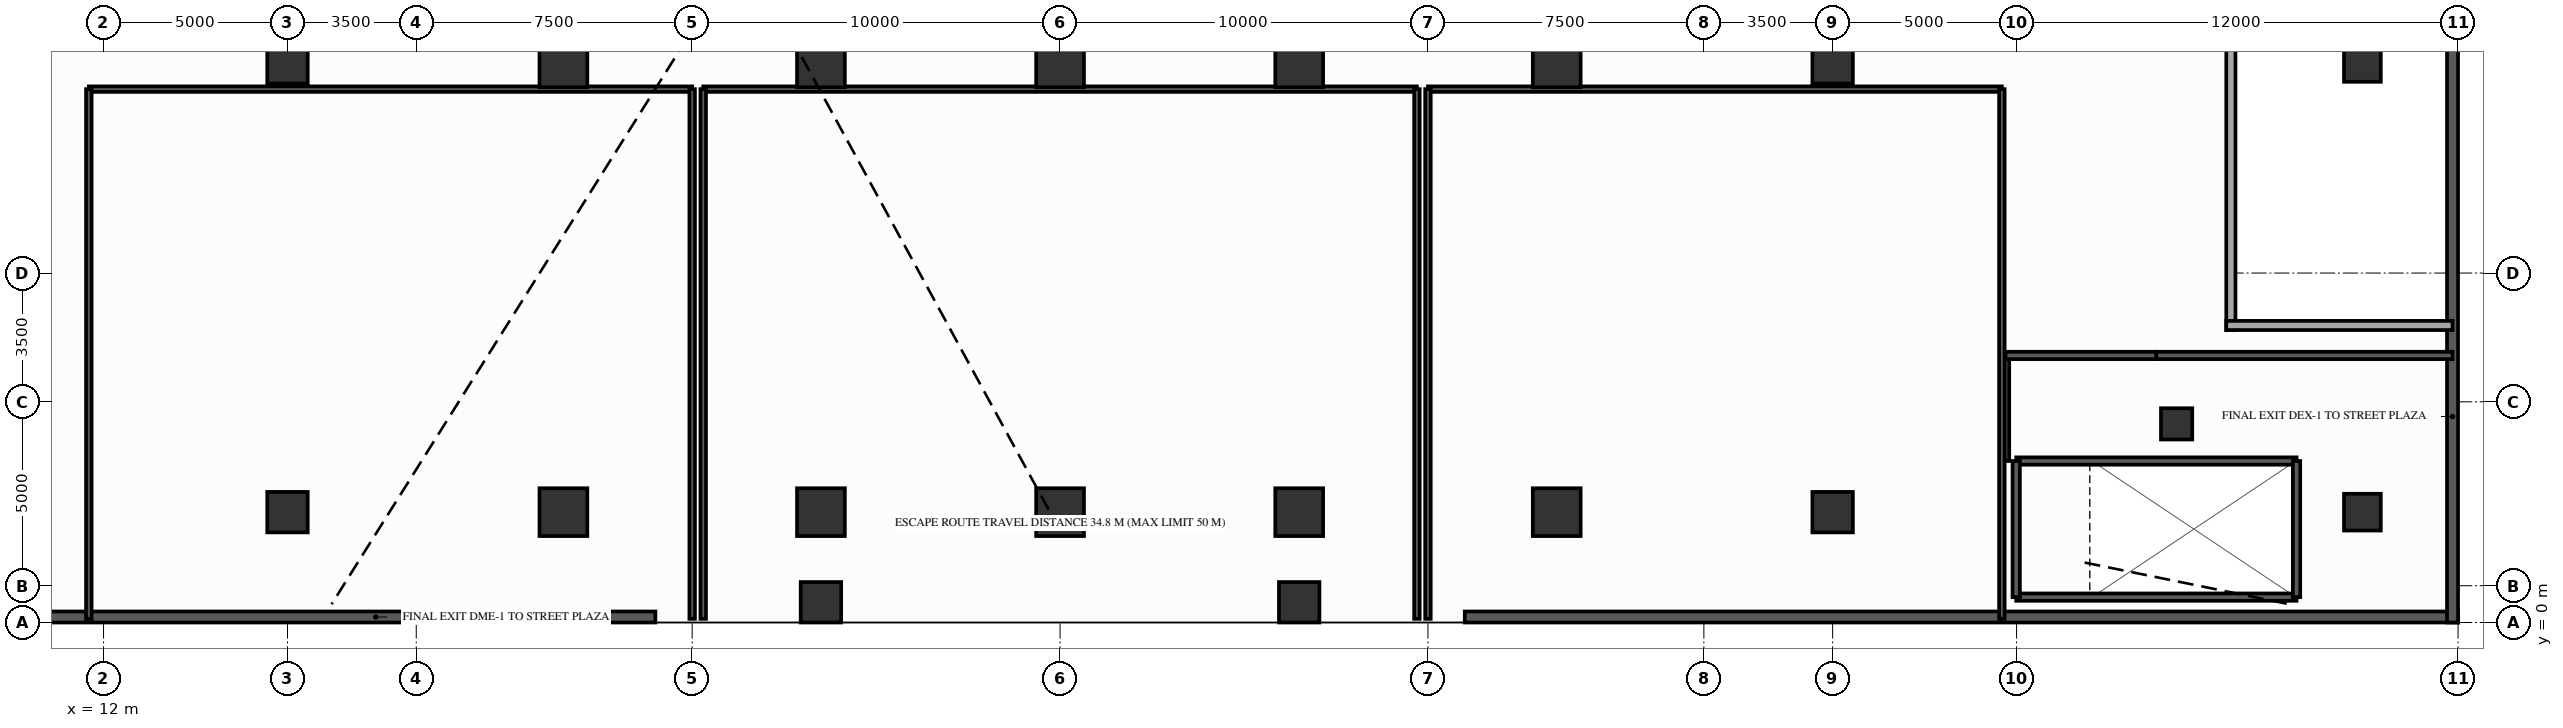
"""IFC4 building model, lengths in metres.
Left out: names, types, materials, properties, quantities, classifications, styles, units other than length and angle.
Written with IfcOpenShell. Run it as: python <this file> out.ifc"""

import sys

from ifc_helpers import new_model, si_unit, direction, frame, frame_2d, origin, origin_2d, place, context, subcontext, project, spatial, rectangle, circle, extrude, source, transform, mapped, element, fill, save


model = new_model("IFC4")
c1 = context("Model", 3, precision=1e-05, world=origin(), true_north=direction((0.0, 1.0)))
c2 = subcontext(c1, "Body", "Model", "MODEL_VIEW")
j1 = project(units=[si_unit("LENGTHUNIT", "METRE"), si_unit("PLANEANGLEUNIT", "RADIAN")], contexts=[c1])
p1 = place(None, origin())
s1 = spatial("IfcSite", under=j1, at=p1, CompositionType="ELEMENT")
p2 = place(p1, origin())
s2 = spatial("IfcBuilding", under=s1, at=p2, CompositionType="ELEMENT")
p3 = place(p2, origin())
s3 = spatial("IfcBuildingStorey", under=s2, at=p3, CompositionType="ELEMENT", Elevation=0.0)
m1 = source(origin(), c2, "Body", "SweptSolid", [
    extrude(circle(Radius=0.5, at=origin_2d()), origin(), (0.0, 0.0, 1.0), 4.2),
])
for number, where, z_axis, x_axis in (
    (1, (73.4, 3.0, 0.0), (0.0, 0.0, 1.0), (1.0, 0.0, 0.0)),
    (2, (73.4, 15.2, 0.0), (0.0, 0.0, 1.0), (1.0, 0.0, 0.0)),
):
    element("IfcColumn", number, at=place(p3, frame(where, z_axis=z_axis, x_axis=x_axis)), inside=s3, PredefinedType="COLUMN", context=c2, shape_type="MappedRepresentation", body=[
        mapped(m1, transform((0.0, 0.0, 0.0), scale=1.0)),
    ])
m2 = source(origin(), c2, "Body", "SweptSolid", [
    extrude(circle(Radius=0.425, at=origin_2d()), origin(), (0.0, 0.0, 1.0), 4.2),
])
p4 = place(p3, frame((68.35, 5.4, 0.0), z_axis=(0.0, 0.0, 1.0), x_axis=(1.0, 0.0, 0.0)))
e3 = element("IfcColumn", 3, at=p4, inside=s3, PredefinedType="COLUMN", context=c2, shape_type="MappedRepresentation", body=[
    mapped(m2, transform((0.0, 0.0, 0.0), scale=1.0)),
])
m3 = source(origin(), c2, "Body", "SweptSolid", [
    extrude(rectangle(XDim=1.1, YDim=1.1, at=origin_2d()), origin(), (0.0, 0.0, 1.0), 4.2),
])
for number, where, z_axis, x_axis in (
    (4, (17.0, 3.0, 0.0), (0.0, 0.0, 1.0), (1.0, 0.0, 0.0)),
    (5, (59.0, 3.0, 0.0), (0.0, 0.0, 1.0), (1.0, 0.0, 0.0)),
    (6, (17.0, 15.2, 0.0), (0.0, 0.0, 1.0), (1.0, 0.0, 0.0)),
    (7, (59.0, 15.2, 0.0), (0.0, 0.0, 1.0), (1.0, 0.0, 0.0)),
):
    element("IfcColumn", number, at=place(p3, frame(where, z_axis=z_axis, x_axis=x_axis)), inside=s3, PredefinedType="COLUMN", context=c2, shape_type="MappedRepresentation", body=[
        mapped(m3, transform((0.0, 0.0, 0.0), scale=1.0)),
    ])
m4 = source(origin(), c2, "Body", "SweptSolid", [
    extrude(rectangle(XDim=1.3, YDim=1.3, at=origin_2d()), origin(), (0.0, 0.0, 1.0), 4.2),
])
for number, where, z_axis, x_axis in (
    (8, (24.5, 3.0, 0.0), (0.0, 0.0, 1.0), (1.0, 0.0, 0.0)),
    (9, (24.5, 15.2, 0.0), (0.0, 0.0, 1.0), (1.0, 0.0, 0.0)),
):
    element("IfcColumn", number, at=place(p3, frame(where, z_axis=z_axis, x_axis=x_axis)), inside=s3, PredefinedType="COLUMN", context=c2, shape_type="MappedRepresentation", body=[
        mapped(m4, transform((0.0, 0.0, 0.0), scale=1.0)),
    ])
p5 = place(p3, frame((31.5, 0.55, 0.0), z_axis=(0.0, 0.0, 1.0), x_axis=(1.0, 0.0, 0.0)))
e10 = element("IfcColumn", 10, at=p5, inside=s3, PredefinedType="COLUMN", context=c2, shape_type="MappedRepresentation", body=[
    mapped(m3, transform((0.0, 0.0, 0.0), scale=1.0)),
])
for number, where, z_axis, x_axis in (
    (11, (31.5, 3.0, 0.0), (0.0, 0.0, 1.0), (1.0, 0.0, 0.0)),
    (12, (31.5, 15.2, 0.0), (0.0, 0.0, 1.0), (1.0, 0.0, 0.0)),
    (13, (38.0, 3.0, 0.0), (0.0, 0.0, 1.0), (1.0, 0.0, 0.0)),
    (14, (38.0, 15.2, 0.0), (0.0, 0.0, 1.0), (1.0, 0.0, 0.0)),
):
    element("IfcColumn", number, at=place(p3, frame(where, z_axis=z_axis, x_axis=x_axis)), inside=s3, PredefinedType="COLUMN", context=c2, shape_type="MappedRepresentation", body=[
        mapped(m4, transform((0.0, 0.0, 0.0), scale=1.0)),
    ])
p6 = place(p3, frame((44.5, 0.55, 0.0), z_axis=(0.0, 0.0, 1.0), x_axis=(1.0, 0.0, 0.0)))
e15 = element("IfcColumn", 15, at=p6, inside=s3, PredefinedType="COLUMN", context=c2, shape_type="MappedRepresentation", body=[
    mapped(m3, transform((0.0, 0.0, 0.0), scale=1.0)),
])
for number, where, z_axis, x_axis in (
    (16, (44.5, 3.0, 0.0), (0.0, 0.0, 1.0), (1.0, 0.0, 0.0)),
    (17, (44.5, 15.2, 0.0), (0.0, 0.0, 1.0), (1.0, 0.0, 0.0)),
    (18, (51.5, 3.0, 0.0), (0.0, 0.0, 1.0), (1.0, 0.0, 0.0)),
    (19, (51.5, 15.2, 0.0), (0.0, 0.0, 1.0), (1.0, 0.0, 0.0)),
):
    element("IfcColumn", number, at=place(p3, frame(where, z_axis=z_axis, x_axis=x_axis)), inside=s3, PredefinedType="COLUMN", context=c2, shape_type="MappedRepresentation", body=[
        mapped(m4, transform((0.0, 0.0, 0.0), scale=1.0)),
    ])
p7 = place(p3, frame((0.0, 0.15, 0.0), z_axis=(0.0, 0.0, 1.0), x_axis=(1.0, 0.0, 0.0)))
e20 = element("IfcWall", 20, at=p7, inside=s3, PredefinedType="SOLIDWALL", context=c2, shape_type="SweptSolid", body=[
    extrude(rectangle(XDim=27.0, YDim=0.3, at=frame_2d((13.5, 0.0))), origin(), (0.0, 0.0, 1.0), 3.48),
])
p8 = place(p7, frame((20.6, 0.0, 0.0), z_axis=(0.0, 0.0, 1.0), x_axis=(-1.0, 0.0, 0.0)))
e21 = element("IfcOpeningElement", 21, at=p8, cuts=e20, PredefinedType="OPENING", context=c2, shape_type="SweptSolid", body=[
    extrude(rectangle(XDim=2.4, YDim=2.4, at=frame_2d((1.2, 1.2))), frame((0.0, 0.162, 0.0), z_axis=(0.0, -1.0, 0.0), x_axis=(1.0, 0.0, 0.0)), (0.0, 0.0, 1.0), 0.324),
])
p9 = place(p7, frame((4.5, 0.0, 0.9)))
e22 = element("IfcOpeningElement", 22, at=p9, cuts=e20, PredefinedType="OPENING", context=c2, shape_type="SweptSolid", body=[
    extrude(rectangle(XDim=2.1, YDim=1.8, at=frame_2d((1.05, 0.9))), frame((0.0, 0.162, 0.0), z_axis=(0.0, -1.0, 0.0), x_axis=(1.0, 0.0, 0.0)), (0.0, 0.0, 1.0), 0.324),
])
p10 = place(p7, frame((11.8, 0.0, 0.9)))
e23 = element("IfcOpeningElement", 23, at=p10, cuts=e20, PredefinedType="OPENING", context=c2, shape_type="SweptSolid", body=[
    extrude(rectangle(XDim=2.1, YDim=1.8, at=frame_2d((1.05, 0.9))), frame((0.0, 0.162, 0.0), z_axis=(0.0, -1.0, 0.0), x_axis=(1.0, 0.0, 0.0)), (0.0, 0.0, 1.0), 0.324),
])
p11 = place(p3, frame((49.0, 0.15, 0.0), z_axis=(0.0, 0.0, 1.0), x_axis=(1.0, 0.0, 0.0)))
e24 = element("IfcWall", 24, at=p11, inside=s3, PredefinedType="SOLIDWALL", context=c2, shape_type="SweptSolid", body=[
    extrude(rectangle(XDim=27.0, YDim=0.3, at=frame_2d((13.5, 0.0))), origin(), (0.0, 0.0, 1.0), 3.48),
])
p12 = place(p11, frame((4.5, 0.0, 0.9)))
e25 = element("IfcOpeningElement", 25, at=p12, cuts=e24, PredefinedType="OPENING", context=c2, shape_type="SweptSolid", body=[
    extrude(rectangle(XDim=2.1, YDim=1.8, at=frame_2d((1.05, 0.9))), frame((0.0, 0.162, 0.0), z_axis=(0.0, -1.0, 0.0), x_axis=(1.0, 0.0, 0.0)), (0.0, 0.0, 1.0), 0.324),
])
p13 = place(p11, frame((12.0, 0.0, 0.9)))
e26 = element("IfcOpeningElement", 26, at=p13, cuts=e24, PredefinedType="OPENING", context=c2, shape_type="SweptSolid", body=[
    extrude(rectangle(XDim=2.1, YDim=1.8, at=frame_2d((1.05, 0.9))), frame((0.0, 0.162, 0.0), z_axis=(0.0, -1.0, 0.0), x_axis=(1.0, 0.0, 0.0)), (0.0, 0.0, 1.0), 0.324),
])
p14 = place(p3, frame((75.85, 0.0, 0.0), z_axis=(0.0, 0.0, 1.0), x_axis=(0.0, 1.0, 0.0)))
e27 = element("IfcWall", 27, at=p14, inside=s3, PredefinedType="SOLIDWALL", context=c2, shape_type="SweptSolid", body=[
    extrude(rectangle(XDim=54.0, YDim=0.3, at=frame_2d((27.0, 0.0))), origin(), (0.0, 0.0, 1.0), 3.48),
])
p15 = place(p14, frame((6.3, 0.0, 0.0), z_axis=(0.0, 0.0, 1.0), x_axis=(-1.0, 0.0, 0.0)))
e28 = element("IfcOpeningElement", 28, at=p15, cuts=e27, PredefinedType="OPENING", context=c2, shape_type="SweptSolid", body=[
    extrude(rectangle(XDim=1.4, YDim=2.2, at=frame_2d((0.7, 1.1))), frame((0.0, 0.162, 0.0), z_axis=(0.0, -1.0, 0.0), x_axis=(1.0, 0.0, 0.0)), (0.0, 0.0, 1.0), 0.324),
])
p16 = place(p14, frame((41.2, 0.0, 0.0)))
e29 = element("IfcOpeningElement", 29, at=p16, cuts=e27, PredefinedType="OPENING", context=c2, shape_type="SweptSolid", body=[
    extrude(rectangle(XDim=5.2, YDim=2.6, at=frame_2d((2.6, 1.3))), frame((0.0, 0.162, 0.0), z_axis=(0.0, -1.0, 0.0), x_axis=(1.0, 0.0, 0.0)), (0.0, 0.0, 1.0), 0.324),
])
p17 = place(p3, frame((69.825, 7.95, 0.0), z_axis=(0.0, 0.0, 1.0), x_axis=(0.0, 1.0, 0.0)))
e30 = element("IfcWall", 30, at=p17, inside=s3, PredefinedType="PARAPET", context=c2, shape_type="SweptSolid", body=[
    extrude(rectangle(XDim=31.85, YDim=0.25, at=frame_2d((15.925, 0.0))), origin(), (0.0, 0.0, 1.0), 1.25),
])
p18 = place(p3, frame((69.7, 8.075, 0.0), z_axis=(0.0, 0.0, 1.0), x_axis=(1.0, 0.0, 0.0)))
e31 = element("IfcWall", 31, at=p18, inside=s3, PredefinedType="PARAPET", context=c2, shape_type="SweptSolid", body=[
    extrude(rectangle(XDim=6.15, YDim=0.25, at=frame_2d((3.075, 0.0))), origin(), (0.0, 0.0, 1.0), 1.25),
])
p19 = place(p3, frame((63.99, 0.69, 0.0), z_axis=(0.0, 0.0, 1.0), x_axis=(1.0, 0.0, 0.0)))
e32 = element("IfcWall", 32, at=p19, inside=s3, PredefinedType="SOLIDWALL", context=c2, shape_type="SweptSolid", body=[
    extrude(rectangle(XDim=7.62, YDim=0.2, at=frame_2d((3.81, 0.0))), origin(), (0.0, 0.0, 1.0), 3.92),
])
p20 = place(p3, frame((63.99, 4.39, 0.0), z_axis=(0.0, 0.0, 1.0), x_axis=(1.0, 0.0, 0.0)))
e33 = element("IfcWall", 33, at=p20, inside=s3, PredefinedType="SOLIDWALL", context=c2, shape_type="SweptSolid", body=[
    extrude(rectangle(XDim=7.62, YDim=0.2, at=frame_2d((3.81, 0.0))), origin(), (0.0, 0.0, 1.0), 3.92),
])
p21 = place(p20, frame((0.45, 0.0, 0.0)))
e34 = element("IfcOpeningElement", 34, at=p21, cuts=e33, PredefinedType="OPENING", context=c2, shape_type="SweptSolid", body=[
    extrude(rectangle(XDim=1.1, YDim=2.15, at=frame_2d((0.55, 1.075))), frame((0.0, 0.112, 0.0), z_axis=(0.0, -1.0, 0.0), x_axis=(1.0, 0.0, 0.0)), (0.0, 0.0, 1.0), 0.224),
])
for number, where, z_axis, x_axis in (
    (35, (63.99, 0.69, 0.0), (0.0, 0.0, 1.0), (0.0, 1.0, 0.0)),
    (36, (71.61, 0.69, 0.0), (0.0, 0.0, 1.0), (0.0, 1.0, 0.0)),
):
    element("IfcWall", number, at=place(p3, frame(where, z_axis=z_axis, x_axis=x_axis)), inside=s3, PredefinedType="SOLIDWALL", context=c2, shape_type="SweptSolid", body=[
        extrude(rectangle(XDim=3.7, YDim=0.2, at=frame_2d((1.85, 0.0))), origin(), (0.0, 0.0, 1.0), 3.92),
    ])
p22 = place(p3, frame((63.7, 4.39, 0.0), z_axis=(0.0, 0.0, 1.0), x_axis=(0.0, 1.0, 0.0)))
e37 = element("IfcWall", 37, at=p22, inside=s3, PredefinedType="PARTITIONING", context=c2, shape_type="SweptSolid", body=[
    extrude(rectangle(XDim=2.87, YDim=0.2, at=frame_2d((1.435, 0.0))), origin(), (0.0, 0.0, 1.0), 3.92),
])
p23 = place(p3, frame((63.7, 7.26, 0.0), z_axis=(0.0, 0.0, 1.0), x_axis=(1.0, 0.0, 0.0)))
e38 = element("IfcWall", 38, at=p23, inside=s3, PredefinedType="PARTITIONING", context=c2, shape_type="SweptSolid", body=[
    extrude(rectangle(XDim=4.1, YDim=0.2, at=frame_2d((2.05, 0.0))), origin(), (0.0, 0.0, 1.0), 3.92),
])
p24 = place(p23, frame((2.6, 0.0, 0.0), z_axis=(0.0, 0.0, 1.0), x_axis=(-1.0, 0.0, 0.0)))
e39 = element("IfcOpeningElement", 39, at=p24, cuts=e38, PredefinedType="OPENING", context=c2, shape_type="SweptSolid", body=[
    extrude(rectangle(XDim=1.1, YDim=2.15, at=frame_2d((0.55, 1.075))), frame((0.0, 0.112, 0.0), z_axis=(0.0, -1.0, 0.0), x_axis=(1.0, 0.0, 0.0)), (0.0, 0.0, 1.0), 0.224),
])
p25 = place(p3, frame((67.8, 7.26, 0.0), z_axis=(0.0, 0.0, 1.0), x_axis=(1.0, 0.0, 0.0)))
e40 = element("IfcWall", 40, at=p25, inside=s3, PredefinedType="PARTITIONING", context=c2, shape_type="SweptSolid", body=[
    extrude(rectangle(XDim=8.05, YDim=0.2, at=frame_2d((4.025, 0.0))), origin(), (0.0, 0.0, 1.0), 3.92),
])
p26 = place(p3, frame((11.6, 14.5, 0.0), z_axis=(0.0, 0.0, 1.0), x_axis=(1.0, 0.0, 0.0)))
e41 = element("IfcWall", 41, at=p26, inside=s3, PredefinedType="PARTITIONING", context=c2, shape_type="SweptSolid", body=[
    extrude(rectangle(XDim=16.4, YDim=0.15, at=frame_2d((8.2, 0.0))), origin(), (0.0, 0.0, 1.0), 3.92),
])
p27 = place(p26, frame((7.24, 0.0, 0.0)))
e42 = element("IfcOpeningElement", 42, at=p27, cuts=e41, PredefinedType="OPENING", context=c2, shape_type="SweptSolid", body=[
    extrude(rectangle(XDim=1.0, YDim=2.1, at=frame_2d((0.5, 1.05))), frame((0.0, 0.087, 0.0), z_axis=(0.0, -1.0, 0.0), x_axis=(1.0, 0.0, 0.0)), (0.0, 0.0, 1.0), 0.174),
])
for number, where, z_axis, x_axis in (
    (43, (11.6, 0.1, 0.0), (0.0, 0.0, 1.0), (0.0, 1.0, 0.0)),
    (44, (28.0, 0.1, 0.0), (0.0, 0.0, 1.0), (0.0, 1.0, 0.0)),
):
    element("IfcWall", number, at=place(p3, frame(where, z_axis=z_axis, x_axis=x_axis)), inside=s3, PredefinedType="PARTITIONING", context=c2, shape_type="SweptSolid", body=[
        extrude(rectangle(XDim=14.4, YDim=0.15, at=frame_2d((7.2, 0.0))), origin(), (0.0, 0.0, 1.0), 3.92),
    ])
p28 = place(p3, frame((28.3, 14.5, 0.0), z_axis=(0.0, 0.0, 1.0), x_axis=(1.0, 0.0, 0.0)))
e45 = element("IfcWall", 45, at=p28, inside=s3, PredefinedType="PARTITIONING", context=c2, shape_type="SweptSolid", body=[
    extrude(rectangle(XDim=19.4, YDim=0.15, at=frame_2d((9.7, 0.0))), origin(), (0.0, 0.0, 1.0), 3.92),
])
p29 = place(p28, frame((6.434, 0.0, 0.0)))
e46 = element("IfcOpeningElement", 46, at=p29, cuts=e45, PredefinedType="OPENING", context=c2, shape_type="SweptSolid", body=[
    extrude(rectangle(XDim=1.0, YDim=2.1, at=frame_2d((0.5, 1.05))), frame((0.0, 0.087, 0.0), z_axis=(0.0, -1.0, 0.0), x_axis=(1.0, 0.0, 0.0)), (0.0, 0.0, 1.0), 0.174),
])
for number, where, z_axis, x_axis in (
    (47, (28.3, 0.1, 0.0), (0.0, 0.0, 1.0), (0.0, 1.0, 0.0)),
    (48, (47.7, 0.1, 0.0), (0.0, 0.0, 1.0), (0.0, 1.0, 0.0)),
):
    element("IfcWall", number, at=place(p3, frame(where, z_axis=z_axis, x_axis=x_axis)), inside=s3, PredefinedType="PARTITIONING", context=c2, shape_type="SweptSolid", body=[
        extrude(rectangle(XDim=14.4, YDim=0.15, at=frame_2d((7.2, 0.0))), origin(), (0.0, 0.0, 1.0), 3.92),
    ])
p30 = place(p3, frame((48.0, 14.5, 0.0), z_axis=(0.0, 0.0, 1.0), x_axis=(1.0, 0.0, 0.0)))
e49 = element("IfcWall", 49, at=p30, inside=s3, PredefinedType="PARTITIONING", context=c2, shape_type="SweptSolid", body=[
    extrude(rectangle(XDim=15.6, YDim=0.15, at=frame_2d((7.8, 0.0))), origin(), (0.0, 0.0, 1.0), 3.92),
])
p31 = place(p30, frame((6.865, 0.0, 0.0)))
e50 = element("IfcOpeningElement", 50, at=p31, cuts=e49, PredefinedType="OPENING", context=c2, shape_type="SweptSolid", body=[
    extrude(rectangle(XDim=1.0, YDim=2.1, at=frame_2d((0.5, 1.05))), frame((0.0, 0.087, 0.0), z_axis=(0.0, -1.0, 0.0), x_axis=(1.0, 0.0, 0.0)), (0.0, 0.0, 1.0), 0.174),
])
for number, where, z_axis, x_axis in (
    (51, (48.0, 0.1, 0.0), (0.0, 0.0, 1.0), (0.0, 1.0, 0.0)),
    (52, (63.6, 0.1, 0.0), (0.0, 0.0, 1.0), (0.0, 1.0, 0.0)),
):
    element("IfcWall", number, at=place(p3, frame(where, z_axis=z_axis, x_axis=x_axis)), inside=s3, PredefinedType="PARTITIONING", context=c2, shape_type="SweptSolid", body=[
        extrude(rectangle(XDim=14.4, YDim=0.15, at=frame_2d((7.2, 0.0))), origin(), (0.0, 0.0, 1.0), 3.92),
    ])
m5 = source(origin(), c2, "Body", "SweptSolid", [
    extrude(rectangle(XDim=2.4, YDim=2.4, at=frame_2d((1.2, 1.2))), frame((0.0, 0.025, 0.0), z_axis=(0.0, -1.0, 0.0), x_axis=(1.0, 0.0, 0.0)), (0.0, 0.0, 1.0), 0.05),
])
p32 = place(p8, origin())
e53 = element("IfcDoor", 53, at=p32, inside=s3, OperationType="DOUBLE_SWING_LEFT", PredefinedType="DOOR", context=c2, shape_type="MappedRepresentation", body=[
    mapped(m5, transform((0.0, 0.0, 0.0), scale=1.0)),
])
fill(e21, e53)
m6 = source(origin(), c2, "Body", "SweptSolid", [
    extrude(rectangle(XDim=1.4, YDim=2.2, at=frame_2d((0.7, 1.1))), frame((0.0, 0.025, 0.0), z_axis=(0.0, -1.0, 0.0), x_axis=(1.0, 0.0, 0.0)), (0.0, 0.0, 1.0), 0.05),
])
p33 = place(p15, origin())
e54 = element("IfcDoor", 54, at=p33, inside=s3, OperationType="SINGLE_SWING_RIGHT", PredefinedType="DOOR", context=c2, shape_type="MappedRepresentation", body=[
    mapped(m6, transform((0.0, 0.0, 0.0), scale=1.0)),
])
fill(e28, e54)
m7 = source(origin(), c2, "Body", "SweptSolid", [
    extrude(rectangle(XDim=2.1, YDim=1.8, at=frame_2d((1.05, 0.9))), frame((0.0, 0.03, 0.0), z_axis=(0.0, -1.0, 0.0), x_axis=(1.0, 0.0, 0.0)), (0.0, 0.0, 1.0), 0.06),
])
p34 = place(p10, origin())
e55 = element("IfcWindow", 55, at=p34, inside=s3, PartitioningType="SINGLE_PANEL", PredefinedType="WINDOW", context=c2, shape_type="MappedRepresentation", body=[
    mapped(m7, transform((0.0, 0.0, 0.0), scale=1.0)),
])
fill(e23, e55)
p35 = place(p12, origin())
e56 = element("IfcWindow", 56, at=p35, inside=s3, PartitioningType="SINGLE_PANEL", PredefinedType="WINDOW", context=c2, shape_type="MappedRepresentation", body=[
    mapped(m7, transform((0.0, 0.0, 0.0), scale=1.0)),
])
fill(e25, e56)
p36 = place(p13, origin())
e57 = element("IfcWindow", 57, at=p36, inside=s3, PartitioningType="SINGLE_PANEL", PredefinedType="WINDOW", context=c2, shape_type="MappedRepresentation", body=[
    mapped(m7, transform((0.0, 0.0, 0.0), scale=1.0)),
])
fill(e26, e57)
m8 = source(origin(), c2, "Body", "SweptSolid", [
    extrude(rectangle(XDim=1.1, YDim=2.15, at=frame_2d((0.55, 1.075))), frame((0.0, 0.025, 0.0), z_axis=(0.0, -1.0, 0.0), x_axis=(1.0, 0.0, 0.0)), (0.0, 0.0, 1.0), 0.05),
])
p37 = place(p21, origin())
e58 = element("IfcDoor", 58, at=p37, inside=s3, OperationType="SINGLE_SWING_RIGHT", PredefinedType="DOOR", context=c2, shape_type="MappedRepresentation", body=[
    mapped(m8, transform((0.0, 0.0, 0.0), scale=1.0)),
])
fill(e34, e58)
p38 = place(p24, origin())
e59 = element("IfcDoor", 59, at=p38, inside=s3, OperationType="SINGLE_SWING_RIGHT", PredefinedType="DOOR", context=c2, shape_type="MappedRepresentation", body=[
    mapped(m8, transform((0.0, 0.0, 0.0), scale=1.0)),
])
fill(e39, e59)
m9 = source(origin(), c2, "Body", "SweptSolid", [
    extrude(rectangle(XDim=1.0, YDim=2.1, at=frame_2d((0.5, 1.05))), frame((0.0, 0.025, 0.0), z_axis=(0.0, -1.0, 0.0), x_axis=(1.0, 0.0, 0.0)), (0.0, 0.0, 1.0), 0.05),
])
p39 = place(p27, origin())
e60 = element("IfcDoor", 60, at=p39, inside=s3, OperationType="SINGLE_SWING_RIGHT", PredefinedType="DOOR", context=c2, shape_type="MappedRepresentation", body=[
    mapped(m9, transform((0.0, 0.0, 0.0), scale=1.0)),
])
fill(e42, e60)
p40 = place(p29, origin())
e61 = element("IfcDoor", 61, at=p40, inside=s3, OperationType="SINGLE_SWING_LEFT", PredefinedType="DOOR", context=c2, shape_type="MappedRepresentation", body=[
    mapped(m9, transform((0.0, 0.0, 0.0), scale=1.0)),
])
fill(e46, e61)
p41 = place(p31, origin())
e62 = element("IfcDoor", 62, at=p41, inside=s3, OperationType="SINGLE_SWING_LEFT", PredefinedType="DOOR", context=c2, shape_type="MappedRepresentation", body=[
    mapped(m9, transform((0.0, 0.0, 0.0), scale=1.0)),
])
fill(e50, e62)
save(model, sys.argv[1])
